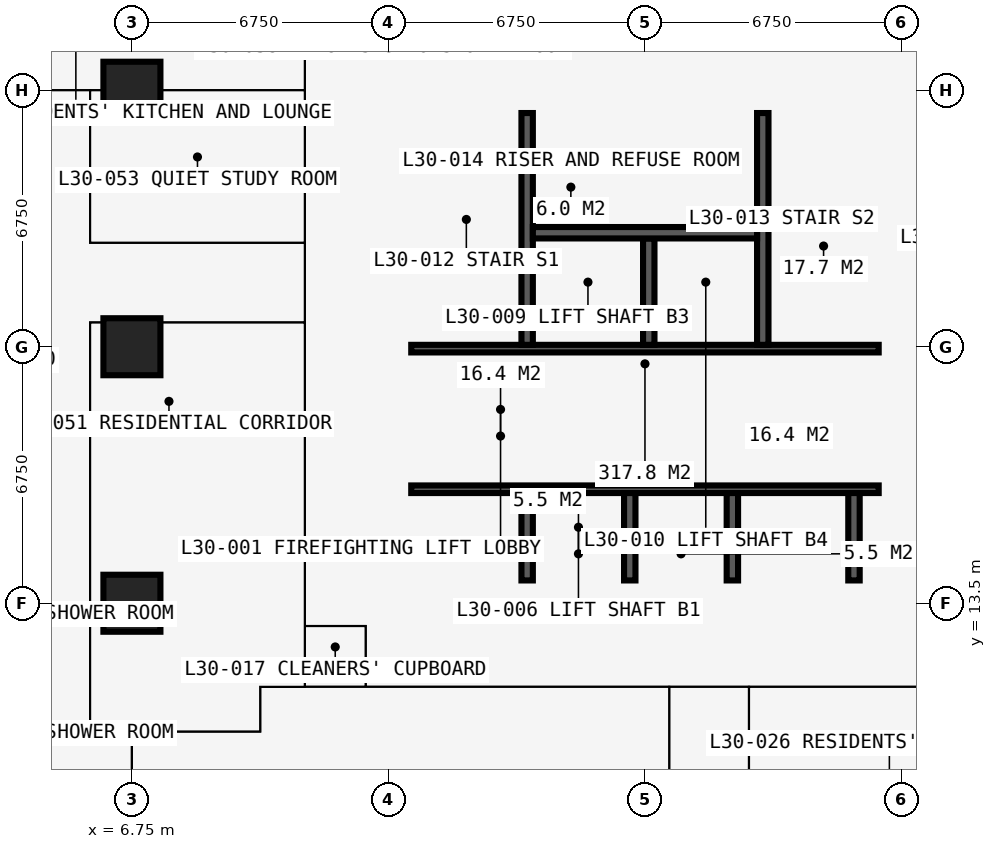
"""IFC4 building model, lengths in metres.
Left out: names, types, materials, properties, quantities, classifications, styles, units other than length and angle.
Written with IfcOpenShell. Run it as: python <this file> out.ifc"""

import sys

from ifc_helpers import new_model, si_unit, direction, frame, frame_2d, origin, origin_2d, place, context, subcontext, project, spatial, rectangle, extrude, element, fill, save


model = new_model("IFC4")
c1 = context("Model", 3, precision=1e-05, world=origin(), true_north=direction((0.0, 1.0)))
c2 = subcontext(c1, "Body", "Model", "MODEL_VIEW")
j1 = project(units=[si_unit("LENGTHUNIT", "METRE"), si_unit("PLANEANGLEUNIT", "RADIAN")], contexts=[c1])
p1 = place(None, origin())
s1 = spatial("IfcSite", under=j1, at=p1, CompositionType="ELEMENT")
p2 = place(p1, origin())
s2 = spatial("IfcBuilding", under=s1, at=p2, CompositionType="ELEMENT")
p3 = place(p2, frame((0.0, 0.0, 112.5)))
s3 = spatial("IfcBuildingStorey", under=s2, at=p3, CompositionType="ELEMENT", Elevation=112.5)
for number, where, z_axis, x_axis in (
    (1, (6.75, 13.5, 0.0), (0.0, 0.0, 1.0), (1.0, 0.0, 0.0)),
    (2, (6.75, 20.25, 0.0), (0.0, 0.0, 1.0), (1.0, 0.0, 0.0)),
    (3, (6.75, 27.0, 0.0), (0.0, 0.0, 1.0), (1.0, 0.0, 0.0)),
):
    element("IfcColumn", number, at=place(p3, frame(where, z_axis=z_axis, x_axis=x_axis)), inside=s3, PredefinedType="COLUMN", context=c2, shape_type="SweptSolid", body=[
        extrude(rectangle(XDim=1.5, YDim=1.5, at=origin_2d()), origin(), (0.0, 0.0, 1.0), 3.6),
    ])
p4 = place(p3, frame((12.9, 13.5, 0.0), z_axis=(0.0, 0.0, 1.0), x_axis=(1.0, 0.0, 0.0)))
e4 = element("IfcWall", 4, at=p4, inside=s3, PredefinedType="SHEAR", context=c2, shape_type="SweptSolid", body=[
    extrude(rectangle(XDim=14.7, YDim=1.2, at=frame_2d((7.35, 0.0))), origin(), (0.0, 0.0, 1.0), 3.6),
])
p5 = place(p3, frame((27.0, 14.1, 0.0), z_axis=(0.0, 0.0, 1.0), x_axis=(0.0, 1.0, 0.0)))
e5 = element("IfcWall", 5, at=p5, inside=s3, PredefinedType="SHEAR", context=c2, shape_type="SweptSolid", body=[
    extrude(rectangle(XDim=12.3, YDim=1.2, at=frame_2d((6.15, 0.0))), origin(), (0.0, 0.0, 1.0), 3.6),
])
p6 = place(p5, frame((3.65, 0.0, 0.0)))
e6 = element("IfcOpeningElement", 6, at=p6, cuts=e5, PredefinedType="OPENING", context=c2, shape_type="SweptSolid", body=[
    extrude(rectangle(XDim=1.2, YDim=2.2, at=frame_2d((0.6, 1.1))), frame((0.0, 0.61, 0.0), z_axis=(0.0, -1.0, 0.0), x_axis=(1.0, 0.0, 0.0)), (0.0, 0.0, 1.0), 1.22),
])
p7 = place(p3, frame((27.6, 27.0, 0.0), z_axis=(0.0, 0.0, 1.0), x_axis=(-1.0, 0.0, 0.0)))
e7 = element("IfcWall", 7, at=p7, inside=s3, PredefinedType="SHEAR", context=c2, shape_type="SweptSolid", body=[
    extrude(rectangle(XDim=14.7, YDim=1.2, at=frame_2d((7.35, 0.0))), origin(), (0.0, 0.0, 1.0), 3.6),
])
p8 = place(p7, frame((5.225, 0.0, 0.0)))
e8 = element("IfcOpeningElement", 8, at=p8, cuts=e7, PredefinedType="OPENING", context=c2, shape_type="SweptSolid", body=[
    extrude(rectangle(XDim=0.9, YDim=2.2, at=frame_2d((0.45, 1.1))), frame((0.0, 0.61, 0.0), z_axis=(0.0, -1.0, 0.0), x_axis=(1.0, 0.0, 0.0)), (0.0, 0.0, 1.0), 1.22),
])
p9 = place(p7, frame((8.2, 0.0, 0.0)))
e9 = element("IfcOpeningElement", 9, at=p9, cuts=e7, PredefinedType="OPENING", context=c2, shape_type="SweptSolid", body=[
    extrude(rectangle(XDim=1.0, YDim=2.2, at=frame_2d((0.5, 1.1))), frame((0.0, 0.61, 0.0), z_axis=(0.0, -1.0, 0.0), x_axis=(1.0, 0.0, 0.0)), (0.0, 0.0, 1.0), 1.22),
])
p10 = place(p3, frame((13.5, 26.4, 0.0), z_axis=(0.0, 0.0, 1.0), x_axis=(0.0, -1.0, 0.0)))
e10 = element("IfcWall", 10, at=p10, inside=s3, PredefinedType="SHEAR", context=c2, shape_type="SweptSolid", body=[
    extrude(rectangle(XDim=12.3, YDim=1.2, at=frame_2d((6.15, 0.0))), origin(), (0.0, 0.0, 1.0), 3.6),
])
p11 = place(p10, frame((7.45, 0.0, 0.0)))
e11 = element("IfcOpeningElement", 11, at=p11, cuts=e10, PredefinedType="OPENING", context=c2, shape_type="SweptSolid", body=[
    extrude(rectangle(XDim=1.2, YDim=2.2, at=frame_2d((0.6, 1.1))), frame((0.0, 0.61, 0.0), z_axis=(0.0, -1.0, 0.0), x_axis=(1.0, 0.0, 0.0)), (0.0, 0.0, 1.0), 1.22),
])
p12 = place(p3, frame((14.1, 16.5, 0.0), z_axis=(0.0, 0.0, 1.0), x_axis=(1.0, 0.0, 0.0)))
e12 = element("IfcWall", 12, at=p12, inside=s3, PredefinedType="SHEAR", context=c2, shape_type="SweptSolid", body=[
    extrude(rectangle(XDim=12.3, YDim=0.2, at=frame_2d((6.15, 0.0))), origin(), (0.0, 0.0, 1.0), 3.6),
])
p13 = place(p12, frame((0.9, 0.0, 0.0)))
e13 = element("IfcOpeningElement", 13, at=p13, cuts=e12, PredefinedType="OPENING", context=c2, shape_type="SweptSolid", body=[
    extrude(rectangle(XDim=1.1, YDim=2.2, at=frame_2d((0.55, 1.1))), frame((0.0, 0.11, 0.0), z_axis=(0.0, -1.0, 0.0), x_axis=(1.0, 0.0, 0.0)), (0.0, 0.0, 1.0), 0.22),
])
p14 = place(p12, frame((9.5, 0.0, 0.0)))
e14 = element("IfcOpeningElement", 14, at=p14, cuts=e12, PredefinedType="OPENING", context=c2, shape_type="SweptSolid", body=[
    extrude(rectangle(XDim=1.1, YDim=2.2, at=frame_2d((0.55, 1.1))), frame((0.0, 0.11, 0.0), z_axis=(0.0, -1.0, 0.0), x_axis=(1.0, 0.0, 0.0)), (0.0, 0.0, 1.0), 0.22),
])
p15 = place(p3, frame((14.1, 20.2, 0.0), z_axis=(0.0, 0.0, 1.0), x_axis=(1.0, 0.0, 0.0)))
e15 = element("IfcWall", 15, at=p15, inside=s3, PredefinedType="SHEAR", context=c2, shape_type="SweptSolid", body=[
    extrude(rectangle(XDim=12.3, YDim=0.2, at=frame_2d((6.15, 0.0))), origin(), (0.0, 0.0, 1.0), 3.6),
])
p16 = place(p15, frame((0.35, 0.0, 0.0)))
e16 = element("IfcOpeningElement", 16, at=p16, cuts=e15, PredefinedType="OPENING", context=c2, shape_type="SweptSolid", body=[
    extrude(rectangle(XDim=1.1, YDim=2.2, at=frame_2d((0.55, 1.1))), frame((0.0, 0.11, 0.0), z_axis=(0.0, -1.0, 0.0), x_axis=(1.0, 0.0, 0.0)), (0.0, 0.0, 1.0), 0.22),
])
p17 = place(p15, frame((9.75, 0.0, 0.0)))
e17 = element("IfcOpeningElement", 17, at=p17, cuts=e15, PredefinedType="OPENING", context=c2, shape_type="SweptSolid", body=[
    extrude(rectangle(XDim=1.1, YDim=2.2, at=frame_2d((0.55, 1.1))), frame((0.0, 0.11, 0.0), z_axis=(0.0, -1.0, 0.0), x_axis=(1.0, 0.0, 0.0)), (0.0, 0.0, 1.0), 0.22),
])
for number, where, z_axis, x_axis in (
    (18, (17.15, 20.3, 0.0), (0.0, 0.0, 1.0), (0.0, 1.0, 0.0)),
    (19, (23.35, 20.3, 0.0), (0.0, 0.0, 1.0), (0.0, 1.0, 0.0)),
):
    element("IfcWall", number, at=place(p3, frame(where, z_axis=z_axis, x_axis=x_axis)), inside=s3, PredefinedType="SHEAR", context=c2, shape_type="SweptSolid", body=[
        extrude(rectangle(XDim=6.1, YDim=0.3, at=frame_2d((3.05, 0.0))), origin(), (0.0, 0.0, 1.0), 3.6),
    ])
p18 = place(p3, frame((20.35, 20.3, 0.0), z_axis=(0.0, 0.0, 1.0), x_axis=(0.0, 1.0, 0.0)))
e20 = element("IfcWall", 20, at=p18, inside=s3, PredefinedType="SHEAR", context=c2, shape_type="SweptSolid", body=[
    extrude(rectangle(XDim=2.8, YDim=0.3, at=frame_2d((1.4, 0.0))), origin(), (0.0, 0.0, 1.0), 3.6),
])
p19 = place(p3, frame((17.3, 23.25, 0.0), z_axis=(0.0, 0.0, 1.0), x_axis=(1.0, 0.0, 0.0)))
e21 = element("IfcWall", 21, at=p19, inside=s3, PredefinedType="SHEAR", context=c2, shape_type="SweptSolid", body=[
    extrude(rectangle(XDim=5.9, YDim=0.3, at=frame_2d((2.95, 0.0))), origin(), (0.0, 0.0, 1.0), 3.6),
])
for number, where, z_axis, x_axis in (
    (22, (17.15, 14.1, 0.0), (0.0, 0.0, 1.0), (0.0, 1.0, 0.0)),
    (23, (19.85, 14.1, 0.0), (0.0, 0.0, 1.0), (0.0, 1.0, 0.0)),
    (24, (22.55, 14.1, 0.0), (0.0, 0.0, 1.0), (0.0, 1.0, 0.0)),
    (25, (25.75, 14.1, 0.0), (0.0, 0.0, 1.0), (0.0, 1.0, 0.0)),
):
    element("IfcWall", number, at=place(p3, frame(where, z_axis=z_axis, x_axis=x_axis)), inside=s3, PredefinedType="SHEAR", context=c2, shape_type="SweptSolid", body=[
        extrude(rectangle(XDim=2.3, YDim=0.3, at=frame_2d((1.15, 0.0))), origin(), (0.0, 0.0, 1.0), 3.6),
    ])
p20 = place(p3, frame((18.875, 16.6, 0.0), z_axis=(0.0, 0.0, 1.0), x_axis=(0.0, 1.0, 0.0)))
e26 = element("IfcWall", 26, at=p20, inside=s3, PredefinedType="PARTITIONING", context=c2, shape_type="SweptSolid", body=[
    extrude(rectangle(XDim=3.5, YDim=0.15, at=frame_2d((1.75, 0.0))), origin(), (0.0, 0.0, 1.0), 3.375),
])
p21 = place(p20, frame((1.15, 0.0, 0.0)))
e27 = element("IfcOpeningElement", 27, at=p21, cuts=e26, PredefinedType="OPENING", context=c2, shape_type="SweptSolid", body=[
    extrude(rectangle(XDim=1.2, YDim=2.2, at=frame_2d((0.6, 1.1))), frame((0.0, 0.085, 0.0), z_axis=(0.0, -1.0, 0.0), x_axis=(1.0, 0.0, 0.0)), (0.0, 0.0, 1.0), 0.17),
])
p22 = place(p3, frame((21.625, 16.6, 0.0), z_axis=(0.0, 0.0, 1.0), x_axis=(0.0, 1.0, 0.0)))
e28 = element("IfcWall", 28, at=p22, inside=s3, PredefinedType="PARTITIONING", context=c2, shape_type="SweptSolid", body=[
    extrude(rectangle(XDim=3.5, YDim=0.15, at=frame_2d((1.75, 0.0))), origin(), (0.0, 0.0, 1.0), 3.375),
])
p23 = place(p22, frame((1.15, 0.0, 0.0)))
e29 = element("IfcOpeningElement", 29, at=p23, cuts=e28, PredefinedType="OPENING", context=c2, shape_type="SweptSolid", body=[
    extrude(rectangle(XDim=1.2, YDim=2.2, at=frame_2d((0.6, 1.1))), frame((0.0, 0.085, 0.0), z_axis=(0.0, -1.0, 0.0), x_axis=(1.0, 0.0, 0.0)), (0.0, 0.0, 1.0), 0.17),
])
p24 = place(p3, frame((20.38, 16.6, 0.0), z_axis=(0.0, 0.0, 1.0), x_axis=(0.0, 1.0, 0.0)))
e30 = element("IfcWall", 30, at=p24, inside=s3, PredefinedType="PARTITIONING", context=c2, shape_type="SweptSolid", body=[
    extrude(rectangle(XDim=3.5, YDim=0.15, at=frame_2d((1.75, 0.0))), origin(), (0.0, 0.0, 1.0), 3.375),
])
p25 = place(p3, frame((19.375, 23.4, 0.0), z_axis=(0.0, 0.0, 1.0), x_axis=(0.0, 1.0, 0.0)))
e31 = element("IfcWall", 31, at=p25, inside=s3, PredefinedType="PARTITIONING", context=c2, shape_type="SweptSolid", body=[
    extrude(rectangle(XDim=3.0, YDim=0.15, at=frame_2d((1.5, 0.0))), origin(), (0.0, 0.0, 1.0), 3.375),
])
p26 = place(p3, frame((-0.734, 10.125, 0.0), z_axis=(0.0, 0.0, 1.0), x_axis=(1.0, 0.0, 0.0)))
e32 = element("IfcWall", 32, at=p26, inside=s3, PredefinedType="PARTITIONING", context=c2, shape_type="SweptSolid", body=[
    extrude(rectangle(XDim=10.859, YDim=0.15, at=frame_2d((5.429, 0.0))), origin(), (0.0, 0.0, 1.0), 3.375),
])
p27 = place(p3, frame((4.15, 27.0, 0.0), z_axis=(0.0, 0.0, 1.0), x_axis=(1.0, 0.0, 0.0)))
e33 = element("IfcWall", 33, at=p27, inside=s3, PredefinedType="PARTITIONING", context=c2, shape_type="SweptSolid", body=[
    extrude(rectangle(XDim=7.15, YDim=0.15, at=frame_2d((3.575, 0.0))), origin(), (0.0, 0.0, 1.0), 2.806),
])
p28 = place(p3, frame((5.65, 10.125, 0.0), z_axis=(0.0, 0.0, 1.0), x_axis=(0.0, 1.0, 0.0)))
e34 = element("IfcWall", 34, at=p28, inside=s3, PredefinedType="PARTITIONING", context=c2, shape_type="SweptSolid", body=[
    extrude(rectangle(XDim=10.762, YDim=0.15, at=frame_2d((5.381, 0.0))), origin(), (0.0, 0.0, 1.0), 3.375),
])
p29 = place(p28, frame((4.9, 0.0, 0.0)))
e35 = element("IfcOpeningElement", 35, at=p29, cuts=e34, PredefinedType="OPENING", context=c2, shape_type="SweptSolid", body=[
    extrude(rectangle(XDim=0.95, YDim=2.2, at=frame_2d((0.475, 1.1))), frame((0.0, 0.085, 0.0), z_axis=(0.0, -1.0, 0.0), x_axis=(1.0, 0.0, 0.0)), (0.0, 0.0, 1.0), 0.17),
])
p30 = place(p3, frame((5.65, 20.887, 0.0), z_axis=(0.0, 0.0, 1.0), x_axis=(1.0, 0.0, 0.0)))
e36 = element("IfcWall", 36, at=p30, inside=s3, PredefinedType="PARTITIONING", context=c2, shape_type="SweptSolid", body=[
    extrude(rectangle(XDim=5.65, YDim=0.15, at=frame_2d((2.825, 0.0))), origin(), (0.0, 0.0, 1.0), 3.375),
])
p31 = place(p3, frame((5.65, 22.988, 0.0), z_axis=(0.0, 0.0, 1.0), x_axis=(0.0, 1.0, 0.0)))
e37 = element("IfcWall", 37, at=p31, inside=s3, PredefinedType="PARTITIONING", context=c2, shape_type="SweptSolid", body=[
    extrude(rectangle(XDim=4.012, YDim=0.15, at=frame_2d((2.006, 0.0))), origin(), (0.0, 0.0, 1.0), 3.375),
])
p32 = place(p3, frame((5.65, 22.988, 0.0), z_axis=(0.0, 0.0, 1.0), x_axis=(1.0, 0.0, 0.0)))
e38 = element("IfcWall", 38, at=p32, inside=s3, PredefinedType="PARTITIONING", context=c2, shape_type="SweptSolid", body=[
    extrude(rectangle(XDim=5.65, YDim=0.15, at=frame_2d((2.825, 0.0))), origin(), (0.0, 0.0, 1.0), 3.375),
])
p33 = place(p32, frame((2.35, 0.0, 0.0)))
e39 = element("IfcOpeningElement", 39, at=p33, cuts=e38, PredefinedType="OPENING", context=c2, shape_type="SweptSolid", body=[
    extrude(rectangle(XDim=0.95, YDim=2.2, at=frame_2d((0.475, 1.1))), frame((0.0, 0.085, 0.0), z_axis=(0.0, -1.0, 0.0), x_axis=(1.0, 0.0, 0.0)), (0.0, 0.0, 1.0), 0.17),
])
p34 = place(p3, frame((6.75, 4.15, 0.0), z_axis=(0.0, 0.0, 1.0), x_axis=(0.0, 1.0, 0.0)))
e40 = element("IfcWall", 40, at=p34, inside=s3, PredefinedType="PARTITIONING", context=c2, shape_type="SweptSolid", body=[
    extrude(rectangle(XDim=5.975, YDim=0.15, at=frame_2d((2.988, 0.0))), origin(), (0.0, 0.0, 1.0), 2.877),
])
p35 = place(p3, frame((10.125, 10.125, 0.0), z_axis=(0.0, 0.0, 1.0), x_axis=(0.0, 1.0, 0.0)))
e41 = element("IfcWall", 41, at=p35, inside=s3, PredefinedType="PARTITIONING", context=c2, shape_type="SweptSolid", body=[
    extrude(rectangle(XDim=1.175, YDim=0.15, at=frame_2d((0.587, 0.0))), origin(), (0.0, 0.0, 1.0), 3.375),
])
p36 = place(p3, frame((10.125, 11.3, 0.0), z_axis=(0.0, 0.0, 1.0), x_axis=(1.0, 0.0, 0.0)))
e42 = element("IfcWall", 42, at=p36, inside=s3, PredefinedType="PARTITIONING", context=c2, shape_type="SweptSolid", body=[
    extrude(rectangle(XDim=20.675, YDim=0.15, at=frame_2d((10.337, 0.0))), origin(), (0.0, 0.0, 1.0), 3.375),
])
p37 = place(p36, frame((11.312, 0.0, 0.0)))
e43 = element("IfcOpeningElement", 43, at=p37, cuts=e42, PredefinedType="OPENING", context=c2, shape_type="SweptSolid", body=[
    extrude(rectangle(XDim=1.0, YDim=2.2, at=frame_2d((0.5, 1.1))), frame((0.0, 0.085, 0.0), z_axis=(0.0, -1.0, 0.0), x_axis=(1.0, 0.0, 0.0)), (0.0, 0.0, 1.0), 0.17),
])
p38 = place(p3, frame((11.3, 11.3, 0.0), z_axis=(0.0, 0.0, 1.0), x_axis=(0.0, 1.0, 0.0)))
e44 = element("IfcWall", 44, at=p38, inside=s3, PredefinedType="PARTITIONING", context=c2, shape_type="SweptSolid", body=[
    extrude(rectangle(XDim=19.3, YDim=0.15, at=frame_2d((9.65, 0.0))), origin(), (0.0, 0.0, 1.0), 3.375),
])
p39 = place(p38, frame((18.1, 0.0, 0.0)))
e45 = element("IfcOpeningElement", 45, at=p39, cuts=e44, PredefinedType="OPENING", context=c2, shape_type="SweptSolid", body=[
    extrude(rectangle(XDim=1.0, YDim=2.2, at=frame_2d((0.5, 1.1))), frame((0.0, 0.085, 0.0), z_axis=(0.0, -1.0, 0.0), x_axis=(1.0, 0.0, 0.0)), (0.0, 0.0, 1.0), 0.17),
])
p40 = place(p38, frame((10.137, 0.0, 0.0)))
e46 = element("IfcOpeningElement", 46, at=p40, cuts=e44, PredefinedType="OPENING", context=c2, shape_type="SweptSolid", body=[
    extrude(rectangle(XDim=1.0, YDim=2.2, at=frame_2d((0.5, 1.1))), frame((0.0, 0.085, 0.0), z_axis=(0.0, -1.0, 0.0), x_axis=(1.0, 0.0, 0.0)), (0.0, 0.0, 1.0), 0.17),
])
p41 = place(p3, frame((11.3, 12.9, 0.0), z_axis=(0.0, 0.0, 1.0), x_axis=(1.0, 0.0, 0.0)))
e47 = element("IfcWall", 47, at=p41, inside=s3, PredefinedType="PARTITIONING", context=c2, shape_type="SweptSolid", body=[
    extrude(rectangle(XDim=1.6, YDim=0.15, at=frame_2d((0.8, 0.0))), origin(), (0.0, 0.0, 1.0), 2.806),
])
p42 = place(p41, frame((0.3, 0.0, 0.0)))
e48 = element("IfcOpeningElement", 48, at=p42, cuts=e47, PredefinedType="OPENING", context=c2, shape_type="SweptSolid", body=[
    extrude(rectangle(XDim=0.95, YDim=2.2, at=frame_2d((0.475, 1.1))), frame((0.0, 0.085, 0.0), z_axis=(0.0, -1.0, 0.0), x_axis=(1.0, 0.0, 0.0)), (0.0, 0.0, 1.0), 0.17),
])
p43 = place(p3, frame((12.9, 11.3, 0.0), z_axis=(0.0, 0.0, 1.0), x_axis=(0.0, 1.0, 0.0)))
e49 = element("IfcWall", 49, at=p43, inside=s3, PredefinedType="PARTITIONING", context=c2, shape_type="SweptSolid", body=[
    extrude(rectangle(XDim=1.6, YDim=0.15, at=frame_2d((0.8, 0.0))), origin(), (0.0, 0.0, 1.0), 3.375),
])
for number, where, z_axis, x_axis in (
    (50, (20.887, 5.65, 0.0), (0.0, 0.0, 1.0), (0.0, 1.0, 0.0)),
    (51, (22.988, 5.65, 0.0), (0.0, 0.0, 1.0), (0.0, 1.0, 0.0)),
):
    element("IfcWall", number, at=place(p3, frame(where, z_axis=z_axis, x_axis=x_axis)), inside=s3, PredefinedType="PARTITIONING", context=c2, shape_type="SweptSolid", body=[
        extrude(rectangle(XDim=5.65, YDim=0.15, at=frame_2d((2.825, 0.0))), origin(), (0.0, 0.0, 1.0), 3.375),
    ])
p44 = place(p13, origin())
e52 = element("IfcDoor", 52, at=p44, inside=s3, OperationType="DOUBLE_DOOR_SLIDING", PredefinedType="DOOR", context=c2, shape_type="SweptSolid", body=[
    extrude(rectangle(XDim=1.1, YDim=2.2, at=frame_2d((0.55, 1.1))), frame((0.0, 0.025, 0.0), z_axis=(0.0, -1.0, 0.0), x_axis=(1.0, 0.0, 0.0)), (0.0, 0.0, 1.0), 0.05),
])
fill(e13, e52)
p45 = place(p14, origin())
e53 = element("IfcDoor", 53, at=p45, inside=s3, OperationType="DOUBLE_DOOR_SLIDING", PredefinedType="DOOR", context=c2, shape_type="SweptSolid", body=[
    extrude(rectangle(XDim=1.1, YDim=2.2, at=frame_2d((0.55, 1.1))), frame((0.0, 0.025, 0.0), z_axis=(0.0, -1.0, 0.0), x_axis=(1.0, 0.0, 0.0)), (0.0, 0.0, 1.0), 0.05),
])
fill(e14, e53)
p46 = place(p11, origin())
e54 = element("IfcDoor", 54, at=p46, inside=s3, OperationType="DOUBLE_DOOR_SINGLE_SWING", PredefinedType="DOOR", context=c2, shape_type="SweptSolid", body=[
    extrude(rectangle(XDim=1.2, YDim=2.2, at=frame_2d((0.6, 1.1))), frame((0.0, 0.025, 0.0), z_axis=(0.0, -1.0, 0.0), x_axis=(1.0, 0.0, 0.0)), (0.0, 0.0, 1.0), 0.05),
])
fill(e11, e54)
p47 = place(p6, origin())
e55 = element("IfcDoor", 55, at=p47, inside=s3, OperationType="DOUBLE_DOOR_SINGLE_SWING", PredefinedType="DOOR", context=c2, shape_type="SweptSolid", body=[
    extrude(rectangle(XDim=1.2, YDim=2.2, at=frame_2d((0.6, 1.1))), frame((0.0, 0.025, 0.0), z_axis=(0.0, -1.0, 0.0), x_axis=(1.0, 0.0, 0.0)), (0.0, 0.0, 1.0), 0.05),
])
fill(e6, e55)
p48 = place(p21, origin())
e56 = element("IfcDoor", 56, at=p48, inside=s3, OperationType="DOUBLE_DOOR_SINGLE_SWING", PredefinedType="DOOR", context=c2, shape_type="SweptSolid", body=[
    extrude(rectangle(XDim=1.2, YDim=2.2, at=frame_2d((0.6, 1.1))), frame((0.0, 0.025, 0.0), z_axis=(0.0, -1.0, 0.0), x_axis=(1.0, 0.0, 0.0)), (0.0, 0.0, 1.0), 0.05),
])
fill(e27, e56)
p49 = place(p23, origin())
e57 = element("IfcDoor", 57, at=p49, inside=s3, OperationType="DOUBLE_DOOR_SINGLE_SWING", PredefinedType="DOOR", context=c2, shape_type="SweptSolid", body=[
    extrude(rectangle(XDim=1.2, YDim=2.2, at=frame_2d((0.6, 1.1))), frame((0.0, 0.025, 0.0), z_axis=(0.0, -1.0, 0.0), x_axis=(1.0, 0.0, 0.0)), (0.0, 0.0, 1.0), 0.05),
])
fill(e29, e57)
p50 = place(p8, origin())
e58 = element("IfcDoor", 58, at=p50, inside=s3, OperationType="SINGLE_SWING_LEFT", PredefinedType="DOOR", context=c2, shape_type="SweptSolid", body=[
    extrude(rectangle(XDim=0.9, YDim=2.2, at=frame_2d((0.45, 1.1))), frame((0.0, 0.4, 0.0), z_axis=(0.0, -1.0, 0.0), x_axis=(1.0, 0.0, 0.0)), (0.0, 0.0, 1.0), 0.8),
])
fill(e8, e58)
p51 = place(p9, origin())
e59 = element("IfcDoor", 59, at=p51, inside=s3, OperationType="SINGLE_SWING_LEFT", PredefinedType="DOOR", context=c2, shape_type="SweptSolid", body=[
    extrude(rectangle(XDim=1.0, YDim=2.2, at=frame_2d((0.5, 1.1))), frame((0.0, 0.025, 0.0), z_axis=(0.0, -1.0, 0.0), x_axis=(1.0, 0.0, 0.0)), (0.0, 0.0, 1.0), 0.05),
])
fill(e9, e59)
p52 = place(p16, origin())
e60 = element("IfcDoor", 60, at=p52, inside=s3, OperationType="SINGLE_SWING_LEFT", PredefinedType="DOOR", context=c2, shape_type="SweptSolid", body=[
    extrude(rectangle(XDim=1.1, YDim=2.2, at=frame_2d((0.55, 1.1))), frame((0.0, 0.025, 0.0), z_axis=(0.0, -1.0, 0.0), x_axis=(1.0, 0.0, 0.0)), (0.0, 0.0, 1.0), 0.05),
])
fill(e16, e60)
p53 = place(p17, origin())
e61 = element("IfcDoor", 61, at=p53, inside=s3, OperationType="SINGLE_SWING_LEFT", PredefinedType="DOOR", context=c2, shape_type="SweptSolid", body=[
    extrude(rectangle(XDim=1.1, YDim=2.2, at=frame_2d((0.55, 1.1))), frame((0.0, 0.025, 0.0), z_axis=(0.0, -1.0, 0.0), x_axis=(1.0, 0.0, 0.0)), (0.0, 0.0, 1.0), 0.05),
])
fill(e17, e61)
p54 = place(p42, origin())
e62 = element("IfcDoor", 62, at=p54, inside=s3, OperationType="SINGLE_SWING_LEFT", PredefinedType="DOOR", context=c2, shape_type="SweptSolid", body=[
    extrude(rectangle(XDim=0.95, YDim=2.2, at=frame_2d((0.475, 1.1))), frame((0.0, 0.025, 0.0), z_axis=(0.0, -1.0, 0.0), x_axis=(1.0, 0.0, 0.0)), (0.0, 0.0, 1.0), 0.05),
])
fill(e48, e62)
p55 = place(p37, origin())
e63 = element("IfcDoor", 63, at=p55, inside=s3, OperationType="SINGLE_SWING_LEFT", PredefinedType="DOOR", context=c2, shape_type="SweptSolid", body=[
    extrude(rectangle(XDim=1.0, YDim=2.2, at=frame_2d((0.5, 1.1))), frame((0.0, 0.025, 0.0), z_axis=(0.0, -1.0, 0.0), x_axis=(1.0, 0.0, 0.0)), (0.0, 0.0, 1.0), 0.05),
])
fill(e43, e63)
p56 = place(p40, origin())
e64 = element("IfcDoor", 64, at=p56, inside=s3, OperationType="SINGLE_SWING_LEFT", PredefinedType="DOOR", context=c2, shape_type="SweptSolid", body=[
    extrude(rectangle(XDim=1.0, YDim=2.2, at=frame_2d((0.5, 1.1))), frame((0.0, 0.025, 0.0), z_axis=(0.0, -1.0, 0.0), x_axis=(1.0, 0.0, 0.0)), (0.0, 0.0, 1.0), 0.05),
])
fill(e46, e64)
p57 = place(p29, origin())
e65 = element("IfcDoor", 65, at=p57, inside=s3, OperationType="SINGLE_SWING_LEFT", PredefinedType="DOOR", context=c2, shape_type="SweptSolid", body=[
    extrude(rectangle(XDim=0.95, YDim=2.2, at=frame_2d((0.475, 1.1))), frame((0.0, 0.025, 0.0), z_axis=(0.0, -1.0, 0.0), x_axis=(1.0, 0.0, 0.0)), (0.0, 0.0, 1.0), 0.05),
])
fill(e35, e65)
p58 = place(p33, origin())
e66 = element("IfcDoor", 66, at=p58, inside=s3, OperationType="SINGLE_SWING_LEFT", PredefinedType="DOOR", context=c2, shape_type="SweptSolid", body=[
    extrude(rectangle(XDim=0.95, YDim=2.2, at=frame_2d((0.475, 1.1))), frame((0.0, 0.025, 0.0), z_axis=(0.0, -1.0, 0.0), x_axis=(1.0, 0.0, 0.0)), (0.0, 0.0, 1.0), 0.05),
])
fill(e39, e66)
save(model, sys.argv[1])
